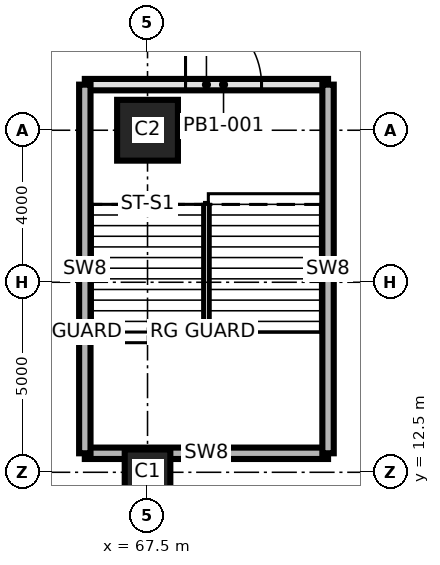
"""IFC4 building model, lengths in metres.
Left out: names, types, materials, properties, quantities, classifications, styles, units other than length and angle.
Written with IfcOpenShell. Run it as: python <this file> out.ifc"""

import sys

from ifc_helpers import new_model, si_unit, direction, frame, frame_2d, origin, origin_2d, place, context, subcontext, project, spatial, rectangle, extrude, element, fill, save


model = new_model("IFC4")
c1 = context("Model", 3, precision=1e-05, world=origin(), true_north=direction((0.0, 1.0)))
c2 = subcontext(c1, "Body", "Model", "MODEL_VIEW")
j1 = project(units=[si_unit("LENGTHUNIT", "METRE"), si_unit("PLANEANGLEUNIT", "RADIAN")], contexts=[c1])
p1 = place(None, origin())
s1 = spatial("IfcSite", under=j1, at=p1, CompositionType="ELEMENT")
p2 = place(p1, origin())
s2 = spatial("IfcBuilding", under=s1, at=p2, CompositionType="ELEMENT")
p3 = place(p2, frame((0.0, 0.0, -4.5)))
s3 = spatial("IfcBuildingStorey", under=s2, at=p3, CompositionType="ELEMENT", Elevation=-4.5)
p4 = place(p3, frame((67.5, 12.5, 0.0), z_axis=(0.0, 0.0, 1.0), x_axis=(1.0, 0.0, 0.0)))
e1 = element("IfcColumn", 1, at=p4, inside=s3, PredefinedType="COLUMN", context=c2, shape_type="SweptSolid", body=[
    extrude(rectangle(XDim=1.2, YDim=1.2, at=origin_2d()), origin(), (0.0, 0.0, 1.0), 4.5),
])
p5 = place(p3, frame((67.5, 21.5, 0.0), z_axis=(0.0, 0.0, 1.0), x_axis=(1.0, 0.0, 0.0)))
e2 = element("IfcColumn", 2, at=p5, inside=s3, PredefinedType="COLUMN", context=c2, shape_type="SweptSolid", body=[
    extrude(rectangle(XDim=1.6, YDim=1.6, at=origin_2d()), origin(), (0.0, 0.0, 1.0), 4.5),
])
p6 = place(p3, frame((65.85, 13.0, 0.0), z_axis=(0.0, 0.0, 1.0), x_axis=(1.0, 0.0, 0.0)))
e3 = element("IfcWall", 3, at=p6, inside=s3, PredefinedType="SHEAR", context=c2, shape_type="SweptSolid", body=[
    extrude(rectangle(XDim=6.4, YDim=0.3, at=frame_2d((3.2, 0.0))), origin(), (0.0, 0.0, 1.0), 4.2),
])
p7 = place(p3, frame((65.85, 22.7, 0.0), z_axis=(0.0, 0.0, 1.0), x_axis=(1.0, 0.0, 0.0)))
e4 = element("IfcWall", 4, at=p7, inside=s3, PredefinedType="SOLIDWALL", context=c2, shape_type="SweptSolid", body=[
    extrude(rectangle(XDim=6.4, YDim=0.3, at=frame_2d((3.2, 0.0))), origin(), (0.0, 0.0, 1.0), 4.2),
])
p8 = place(p7, frame((2.65, 0.0, 0.0)))
e5 = element("IfcOpeningElement", 5, at=p8, cuts=e4, PredefinedType="OPENING", context=c2, shape_type="SweptSolid", body=[
    extrude(rectangle(XDim=2.0, YDim=2.1, at=frame_2d((1.0, 1.05))), frame((0.0, 0.16, 0.0), z_axis=(0.0, -1.0, 0.0), x_axis=(1.0, 0.0, 0.0)), (0.0, 0.0, 1.0), 0.32),
])
for number, where, z_axis, x_axis in (
    (6, (65.85, 13.0, 0.0), (0.0, 0.0, 1.0), (0.0, 1.0, 0.0)),
    (7, (72.25, 13.0, 0.0), (0.0, 0.0, 1.0), (0.0, 1.0, 0.0)),
):
    element("IfcWall", number, at=place(p3, frame(where, z_axis=z_axis, x_axis=x_axis)), inside=s3, PredefinedType="SHEAR", context=c2, shape_type="SweptSolid", body=[
        extrude(rectangle(XDim=9.7, YDim=0.3, at=frame_2d((4.85, 0.0))), origin(), (0.0, 0.0, 1.0), 4.2),
    ])
p9 = place(p8, origin())
e8 = element("IfcDoor", 8, at=p9, inside=s3, OperationType="SINGLE_SWING_LEFT", PredefinedType="DOOR", context=c2, shape_type="SweptSolid", body=[
    extrude(rectangle(XDim=2.0, YDim=2.1, at=frame_2d((1.0, 1.05))), frame((0.0, 0.025, 0.0), z_axis=(0.0, -1.0, 0.0), x_axis=(1.0, 0.0, 0.0)), (0.0, 0.0, 1.0), 0.05),
])
fill(e5, e8)
save(model, sys.argv[1])
